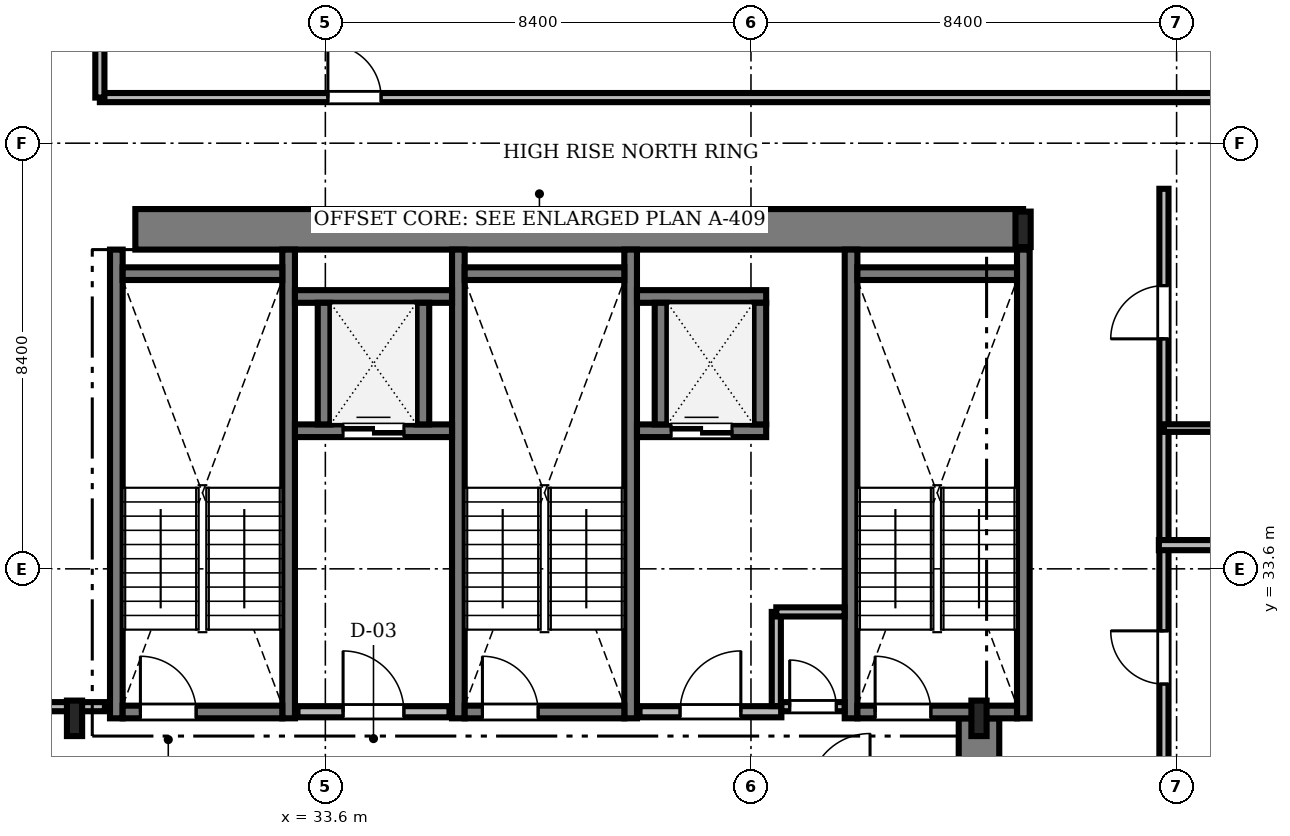
"""IFC4 building model, lengths in metres.
Left out: names, types, materials, properties, quantities, classifications, styles, units other than length and angle.
Written with IfcOpenShell. Run it as: python <this file> out.ifc"""

import sys

from ifc_helpers import new_model, si_unit, direction, frame, frame_2d, origin, origin_2d, place, context, subcontext, project, spatial, rectangle, i_section, extrude, source, transform, mapped, element, fill, save


model = new_model("IFC4")
c1 = context("Model", 3, precision=1e-05, world=origin(), true_north=direction((0.0, 1.0)))
c2 = subcontext(c1, "Body", "Model", "MODEL_VIEW")
j1 = project(units=[si_unit("LENGTHUNIT", "METRE"), si_unit("PLANEANGLEUNIT", "RADIAN")], contexts=[c1])
p1 = place(None, origin())
s1 = spatial("IfcSite", under=j1, at=p1, CompositionType="ELEMENT")
p2 = place(p1, origin())
s2 = spatial("IfcBuilding", under=s1, at=p2, CompositionType="ELEMENT")
p3 = place(p2, frame((0.0, 0.0, 196.05)))
s3 = spatial("IfcBuildingStorey", under=s2, at=p3, CompositionType="ELEMENT", Elevation=196.05)
m1 = source(origin(), c2, "Body", "SweptSolid", [
    extrude(rectangle(XDim=17.52, YDim=0.8, at=frame_2d((8.76, 0.0))), origin(), (0.0, 0.0, 1.0), 3.53),
])
p4 = place(p3, frame((29.85, 40.3, 0.0), z_axis=(0.0, 0.0, 1.0), x_axis=(1.0, 0.0, 0.0)))
e1 = element("IfcWall", 1, at=p4, inside=s3, PredefinedType="SHEAR", context=c2, shape_type="MappedRepresentation", body=[
    mapped(m1, transform((0.0, 0.0, 0.0), scale=1.0)),
])
m2 = source(origin(), c2, "Body", "SweptSolid", [
    extrude(rectangle(XDim=13.15, YDim=0.8, at=frame_2d((6.575, 0.0))), origin(), (0.0, 0.0, 1.0), 3.53),
])
p5 = place(p3, frame((46.5, 17.5, 0.0), z_axis=(0.0, 0.0, 1.0), x_axis=(0.0, 1.0, 0.0)))
e2 = element("IfcWall", 2, at=p5, inside=s3, PredefinedType="SHEAR", context=c2, shape_type="MappedRepresentation", body=[
    mapped(m2, transform((0.0, 0.0, 0.0), scale=1.0)),
])
m3 = source(origin(), c2, "Body", "SweptSolid", [
    extrude(i_section(OverallWidth=0.3, OverallDepth=0.7, WebThickness=0.017, FlangeThickness=0.032, FilletRadius=0.027, at=origin_2d()), origin(), (0.0, 0.0, 1.0), 3.53),
])
for number, where, z_axis, x_axis in (
    (3, (28.65, 30.65, 0.0), (0.0, 0.0, 1.0), (1.0, 0.0, 0.0)),
    (4, (46.5, 30.65, 0.0), (0.0, 0.0, 1.0), (1.0, 0.0, 0.0)),
    (5, (47.37, 40.3, 0.0), (0.0, 0.0, 1.0), (1.0, 0.0, 0.0)),
):
    element("IfcColumn", number, at=place(p3, frame(where, z_axis=z_axis, x_axis=x_axis)), inside=s3, PredefinedType="COLUMN", context=c2, shape_type="MappedRepresentation", body=[
        mapped(m3, transform((0.0, 0.0, 0.0), scale=1.0)),
    ])
m4 = source(origin(), c2, "Body", "SweptSolid", [
    extrude(rectangle(XDim=9.25, YDim=0.25, at=frame_2d((4.625, 0.0))), origin(), (0.0, 0.0, 1.0), 3.55),
])
for number, where, z_axis, x_axis in (
    (6, (29.475, 30.65, 0.0), (0.0, 0.0, 1.0), (0.0, 1.0, 0.0)),
    (7, (32.875, 30.65, 0.0), (0.0, 0.0, 1.0), (0.0, 1.0, 0.0)),
):
    element("IfcWall", number, at=place(p3, frame(where, z_axis=z_axis, x_axis=x_axis)), inside=s3, PredefinedType="SOLIDWALL", context=c2, shape_type="MappedRepresentation", body=[
        mapped(m4, transform((0.0, 0.0, 0.0), scale=1.0)),
    ])
m5 = source(origin(), c2, "Body", "SweptSolid", [
    extrude(rectangle(XDim=3.15, YDim=0.25, at=frame_2d((1.575, 0.0))), origin(), (0.0, 0.0, 1.0), 3.55),
])
p6 = place(p3, frame((29.6, 39.425, 0.0), z_axis=(0.0, 0.0, 1.0), x_axis=(1.0, 0.0, 0.0)))
e8 = element("IfcWall", 8, at=p6, inside=s3, PredefinedType="SOLIDWALL", context=c2, shape_type="MappedRepresentation", body=[
    mapped(m5, transform((0.0, 0.0, 0.0), scale=1.0)),
])
p7 = place(p3, frame((29.6, 30.775, 0.0), z_axis=(0.0, 0.0, 1.0), x_axis=(1.0, 0.0, 0.0)))
e9 = element("IfcWall", 9, at=p7, inside=s3, PredefinedType="SOLIDWALL", context=c2, shape_type="MappedRepresentation", body=[
    mapped(m5, transform((0.0, 0.0, 0.0), scale=1.0)),
])
m6 = source(origin(), c2, "Body", "SweptSolid", [
    extrude(rectangle(XDim=1.1, YDim=2.2, at=frame_2d((0.55, 1.1))), frame((0.0, 0.135, 0.0), z_axis=(0.0, -1.0, 0.0), x_axis=(1.0, 0.0, 0.0)), (0.0, 0.0, 1.0), 0.27),
])
p8 = place(p7, frame((0.35, 0.0, 0.0)))
e10 = element("IfcOpeningElement", 10, at=p8, cuts=e9, PredefinedType="OPENING", context=c2, shape_type="MappedRepresentation", body=[
    mapped(m6, transform((0.0, 0.0, 0.0), scale=1.0)),
])
for number, where, z_axis, x_axis in (
    (11, (36.225, 30.65, 0.0), (0.0, 0.0, 1.0), (0.0, 1.0, 0.0)),
    (12, (39.625, 30.65, 0.0), (0.0, 0.0, 1.0), (0.0, 1.0, 0.0)),
):
    element("IfcWall", number, at=place(p3, frame(where, z_axis=z_axis, x_axis=x_axis)), inside=s3, PredefinedType="SOLIDWALL", context=c2, shape_type="MappedRepresentation", body=[
        mapped(m4, transform((0.0, 0.0, 0.0), scale=1.0)),
    ])
p9 = place(p3, frame((36.35, 39.425, 0.0), z_axis=(0.0, 0.0, 1.0), x_axis=(1.0, 0.0, 0.0)))
e13 = element("IfcWall", 13, at=p9, inside=s3, PredefinedType="SOLIDWALL", context=c2, shape_type="MappedRepresentation", body=[
    mapped(m5, transform((0.0, 0.0, 0.0), scale=1.0)),
])
p10 = place(p3, frame((36.35, 30.775, 0.0), z_axis=(0.0, 0.0, 1.0), x_axis=(1.0, 0.0, 0.0)))
e14 = element("IfcWall", 14, at=p10, inside=s3, PredefinedType="SOLIDWALL", context=c2, shape_type="MappedRepresentation", body=[
    mapped(m5, transform((0.0, 0.0, 0.0), scale=1.0)),
])
p11 = place(p10, frame((0.35, 0.0, 0.0)))
e15 = element("IfcOpeningElement", 15, at=p11, cuts=e14, PredefinedType="OPENING", context=c2, shape_type="MappedRepresentation", body=[
    mapped(m6, transform((0.0, 0.0, 0.0), scale=1.0)),
])
for number, where, z_axis, x_axis in (
    (16, (43.975, 30.65, 0.0), (0.0, 0.0, 1.0), (0.0, 1.0, 0.0)),
    (17, (47.375, 30.65, 0.0), (0.0, 0.0, 1.0), (0.0, 1.0, 0.0)),
):
    element("IfcWall", number, at=place(p3, frame(where, z_axis=z_axis, x_axis=x_axis)), inside=s3, PredefinedType="SOLIDWALL", context=c2, shape_type="MappedRepresentation", body=[
        mapped(m4, transform((0.0, 0.0, 0.0), scale=1.0)),
    ])
p12 = place(p3, frame((44.1, 39.425, 0.0), z_axis=(0.0, 0.0, 1.0), x_axis=(1.0, 0.0, 0.0)))
e18 = element("IfcWall", 18, at=p12, inside=s3, PredefinedType="SOLIDWALL", context=c2, shape_type="MappedRepresentation", body=[
    mapped(m5, transform((0.0, 0.0, 0.0), scale=1.0)),
])
p13 = place(p3, frame((44.1, 30.775, 0.0), z_axis=(0.0, 0.0, 1.0), x_axis=(1.0, 0.0, 0.0)))
e19 = element("IfcWall", 19, at=p13, inside=s3, PredefinedType="SOLIDWALL", context=c2, shape_type="MappedRepresentation", body=[
    mapped(m5, transform((0.0, 0.0, 0.0), scale=1.0)),
])
p14 = place(p13, frame((0.35, 0.0, 0.0)))
e20 = element("IfcOpeningElement", 20, at=p14, cuts=e19, PredefinedType="OPENING", context=c2, shape_type="MappedRepresentation", body=[
    mapped(m6, transform((0.0, 0.0, 0.0), scale=1.0)),
])
m7 = source(origin(), c2, "Body", "SweptSolid", [
    extrude(rectangle(XDim=3.0, YDim=0.22, at=frame_2d((1.5, 0.0))), origin(), (0.0, 0.0, 1.0), 3.53),
])
p15 = place(p3, frame((33.05, 30.78, 0.0), z_axis=(0.0, 0.0, 1.0), x_axis=(1.0, 0.0, 0.0)))
e21 = element("IfcWall", 21, at=p15, inside=s3, PredefinedType="SOLIDWALL", context=c2, shape_type="MappedRepresentation", body=[
    mapped(m7, transform((0.0, 0.0, 0.0), scale=1.0)),
])
m8 = source(origin(), c2, "Body", "SweptSolid", [
    extrude(rectangle(XDim=1.2, YDim=2.2, at=frame_2d((0.6, 1.1))), frame((0.0, 0.12, 0.0), z_axis=(0.0, -1.0, 0.0), x_axis=(1.0, 0.0, 0.0)), (0.0, 0.0, 1.0), 0.24),
])
p16 = place(p15, frame((0.9, 0.0, 0.0)))
e22 = element("IfcOpeningElement", 22, at=p16, cuts=e21, PredefinedType="OPENING", context=c2, shape_type="MappedRepresentation", body=[
    mapped(m8, transform((0.0, 0.0, 0.0), scale=1.0)),
])
m9 = source(origin(), c2, "Body", "SweptSolid", [
    extrude(rectangle(XDim=2.8, YDim=0.22, at=frame_2d((1.4, 0.0))), origin(), (0.0, 0.0, 1.0), 3.53),
])
p17 = place(p3, frame((39.8, 30.78, 0.0), z_axis=(0.0, 0.0, 1.0), x_axis=(1.0, 0.0, 0.0)))
e23 = element("IfcWall", 23, at=p17, inside=s3, PredefinedType="SOLIDWALL", context=c2, shape_type="MappedRepresentation", body=[
    mapped(m9, transform((0.0, 0.0, 0.0), scale=1.0)),
])
p18 = place(p17, frame((0.8, 0.0, 0.0)))
e24 = element("IfcOpeningElement", 24, at=p18, cuts=e23, PredefinedType="OPENING", context=c2, shape_type="MappedRepresentation", body=[
    mapped(m8, transform((0.0, 0.0, 0.0), scale=1.0)),
])
m10 = source(origin(), c2, "Body", "SweptSolid", [
    extrude(rectangle(XDim=3.1, YDim=0.25, at=frame_2d((1.55, 0.0))), origin(), (0.0, 0.0, 1.0), 3.53),
])
p19 = place(p3, frame((33.0, 36.325, 0.0), z_axis=(0.0, 0.0, 1.0), x_axis=(1.0, 0.0, 0.0)))
e25 = element("IfcWall", 25, at=p19, inside=s3, PredefinedType="SOLIDWALL", context=c2, shape_type="MappedRepresentation", body=[
    mapped(m10, transform((0.0, 0.0, 0.0), scale=1.0)),
])
m11 = source(origin(), c2, "Body", "SweptSolid", [
    extrude(rectangle(XDim=1.2, YDim=2.25, at=frame_2d((0.6, 1.125))), frame((0.0, 0.135, 0.0), z_axis=(0.0, -1.0, 0.0), x_axis=(1.0, 0.0, 0.0)), (0.0, 0.0, 1.0), 0.27),
])
p20 = place(p19, frame((0.95, 0.0, 0.0)))
e26 = element("IfcOpeningElement", 26, at=p20, cuts=e25, PredefinedType="OPENING", context=c2, shape_type="MappedRepresentation", body=[
    mapped(m11, transform((0.0, 0.0, 0.0), scale=1.0)),
])
p21 = place(p3, frame((33.0, 38.975, 0.0), z_axis=(0.0, 0.0, 1.0), x_axis=(1.0, 0.0, 0.0)))
e27 = element("IfcWall", 27, at=p21, inside=s3, PredefinedType="SOLIDWALL", context=c2, shape_type="MappedRepresentation", body=[
    mapped(m10, transform((0.0, 0.0, 0.0), scale=1.0)),
])
m12 = source(origin(), c2, "Body", "SweptSolid", [
    extrude(rectangle(XDim=2.4, YDim=0.25, at=frame_2d((1.2, 0.0))), origin(), (0.0, 0.0, 1.0), 3.53),
])
for number, where, z_axis, x_axis in (
    (28, (33.575, 36.45, 0.0), (0.0, 0.0, 1.0), (0.0, 1.0, 0.0)),
    (29, (35.525, 36.45, 0.0), (0.0, 0.0, 1.0), (0.0, 1.0, 0.0)),
):
    element("IfcWall", number, at=place(p3, frame(where, z_axis=z_axis, x_axis=x_axis)), inside=s3, PredefinedType="SOLIDWALL", context=c2, shape_type="MappedRepresentation", body=[
        mapped(m12, transform((0.0, 0.0, 0.0), scale=1.0)),
    ])
m13 = source(origin(), c2, "Body", "SweptSolid", [
    extrude(rectangle(XDim=2.55, YDim=0.25, at=frame_2d((1.275, 0.0))), origin(), (0.0, 0.0, 1.0), 3.53),
])
p22 = place(p3, frame((39.75, 36.325, 0.0), z_axis=(0.0, 0.0, 1.0), x_axis=(1.0, 0.0, 0.0)))
e30 = element("IfcWall", 30, at=p22, inside=s3, PredefinedType="SOLIDWALL", context=c2, shape_type="MappedRepresentation", body=[
    mapped(m13, transform((0.0, 0.0, 0.0), scale=1.0)),
])
p23 = place(p22, frame((0.675, 0.0, 0.0)))
e31 = element("IfcOpeningElement", 31, at=p23, cuts=e30, PredefinedType="OPENING", context=c2, shape_type="MappedRepresentation", body=[
    mapped(m11, transform((0.0, 0.0, 0.0), scale=1.0)),
])
p24 = place(p3, frame((39.75, 38.975, 0.0), z_axis=(0.0, 0.0, 1.0), x_axis=(1.0, 0.0, 0.0)))
e32 = element("IfcWall", 32, at=p24, inside=s3, PredefinedType="SOLIDWALL", context=c2, shape_type="MappedRepresentation", body=[
    mapped(m13, transform((0.0, 0.0, 0.0), scale=1.0)),
])
for number, where, z_axis, x_axis in (
    (33, (40.225, 36.45, 0.0), (0.0, 0.0, 1.0), (0.0, 1.0, 0.0)),
    (34, (42.175, 36.45, 0.0), (0.0, 0.0, 1.0), (0.0, 1.0, 0.0)),
):
    element("IfcWall", number, at=place(p3, frame(where, z_axis=z_axis, x_axis=x_axis)), inside=s3, PredefinedType="SOLIDWALL", context=c2, shape_type="MappedRepresentation", body=[
        mapped(m12, transform((0.0, 0.0, 0.0), scale=1.0)),
    ])
m14 = source(origin(), c2, "Body", "SweptSolid", [
    extrude(rectangle(XDim=28.428, YDim=0.18, at=frame_2d((14.214, 0.0))), origin(), (0.0, 0.0, 1.0), 2.772),
])
p25 = place(p3, frame((29.15, 42.9, 0.0), z_axis=(0.0, 0.0, 1.0), x_axis=(1.0, 0.0, 0.0)))
e35 = element("IfcWall", 35, at=p25, inside=s3, PredefinedType="PARTITIONING", context=c2, shape_type="MappedRepresentation", body=[
    mapped(m14, transform((0.0, 0.0, 0.0), scale=1.0)),
])
m15 = source(origin(), c2, "Body", "SweptSolid", [
    extrude(rectangle(XDim=1.05, YDim=2.2, at=frame_2d((0.525, 1.1))), frame((0.0, 0.1, 0.0), z_axis=(0.0, -1.0, 0.0), x_axis=(1.0, 0.0, 0.0)), (0.0, 0.0, 1.0), 0.2),
])
p26 = place(p25, frame((4.5, 0.0, 0.0)))
e36 = element("IfcOpeningElement", 36, at=p26, cuts=e35, PredefinedType="OPENING", context=c2, shape_type="MappedRepresentation", body=[
    mapped(m15, transform((0.0, 0.0, 0.0), scale=1.0)),
])
m16 = source(origin(), c2, "Body", "SweptSolid", [
    extrude(rectangle(XDim=27.47, YDim=0.18, at=frame_2d((13.735, 0.0))), origin(), (0.0, 0.0, 1.0), 2.972),
])
p27 = place(p3, frame((50.15, 13.63, 0.0), z_axis=(0.0, 0.0, 1.0), x_axis=(0.0, 1.0, 0.0)))
e37 = element("IfcWall", 37, at=p27, inside=s3, PredefinedType="PARTITIONING", context=c2, shape_type="MappedRepresentation", body=[
    mapped(m16, transform((0.0, 0.0, 0.0), scale=1.0)),
])
p28 = place(p27, frame((4.071, 0.0, 0.0)))
e38 = element("IfcOpeningElement", 38, at=p28, cuts=e37, PredefinedType="OPENING", context=c2, shape_type="MappedRepresentation", body=[
    mapped(m15, transform((0.0, 0.0, 0.0), scale=1.0)),
])
p29 = place(p27, frame((10.884, 0.0, 0.0)))
e39 = element("IfcOpeningElement", 39, at=p29, cuts=e37, PredefinedType="OPENING", context=c2, shape_type="MappedRepresentation", body=[
    mapped(m15, transform((0.0, 0.0, 0.0), scale=1.0)),
])
p30 = place(p27, frame((17.696, 0.0, 0.0)))
e40 = element("IfcOpeningElement", 40, at=p30, cuts=e37, PredefinedType="OPENING", context=c2, shape_type="MappedRepresentation", body=[
    mapped(m15, transform((0.0, 0.0, 0.0), scale=1.0)),
])
p31 = place(p27, frame((24.509, 0.0, 0.0)))
e41 = element("IfcOpeningElement", 41, at=p31, cuts=e37, PredefinedType="OPENING", context=c2, shape_type="MappedRepresentation", body=[
    mapped(m15, transform((0.0, 0.0, 0.0), scale=1.0)),
])
m17 = source(origin(), c2, "Body", "SweptSolid", [
    extrude(rectangle(XDim=17.828, YDim=0.18, at=frame_2d((8.914, 0.0))), origin(), (0.0, 0.0, 1.0), 2.772),
])
p32 = place(p3, frame((11.422, 30.88, 0.0), z_axis=(0.0, 0.0, 1.0), x_axis=(1.0, 0.0, 0.0)))
e42 = element("IfcWall", 42, at=p32, inside=s3, PredefinedType="PARTITIONING", context=c2, shape_type="MappedRepresentation", body=[
    mapped(m17, transform((0.0, 0.0, 0.0), scale=1.0)),
])
p33 = place(p32, frame((10.778, 0.0, 0.0)))
e43 = element("IfcOpeningElement", 43, at=p33, cuts=e42, PredefinedType="OPENING", context=c2, shape_type="MappedRepresentation", body=[
    mapped(m15, transform((0.0, 0.0, 0.0), scale=1.0)),
])
m18 = source(origin(), c2, "Body", "SweptSolid", [
    extrude(rectangle(XDim=1.248, YDim=0.18, at=frame_2d((0.624, 0.0))), origin(), (0.0, 0.0, 1.0), 3.53),
])
p34 = place(p3, frame((42.6, 30.88, 0.0), z_axis=(0.0, 0.0, 1.0), x_axis=(1.0, 0.0, 0.0)))
e44 = element("IfcWall", 44, at=p34, inside=s3, PredefinedType="PARTITIONING", context=c2, shape_type="MappedRepresentation", body=[
    mapped(m18, transform((0.0, 0.0, 0.0), scale=1.0)),
])
m19 = source(origin(), c2, "Body", "SweptSolid", [
    extrude(rectangle(XDim=0.92, YDim=2.1, at=frame_2d((0.46, 1.05))), frame((0.0, 0.1, 0.0), z_axis=(0.0, -1.0, 0.0), x_axis=(1.0, 0.0, 0.0)), (0.0, 0.0, 1.0), 0.2),
])
p35 = place(p34, frame((0.164, 0.0, 0.0)))
e45 = element("IfcOpeningElement", 45, at=p35, cuts=e44, PredefinedType="OPENING", context=c2, shape_type="MappedRepresentation", body=[
    mapped(m19, transform((0.0, 0.0, 0.0), scale=1.0)),
])
m20 = source(origin(), c2, "Body", "SweptSolid", [
    extrude(rectangle(XDim=7.528, YDim=0.2, at=frame_2d((3.764, 0.0))), origin(), (0.0, 0.0, 1.0), 2.772),
])
p36 = place(p3, frame((50.05, 34.068, 0.0), z_axis=(0.0, 0.0, 1.0), x_axis=(1.0, 0.0, 0.0)))
e46 = element("IfcWall", 46, at=p36, inside=s3, PredefinedType="PARTITIONING", context=c2, shape_type="MappedRepresentation", body=[
    mapped(m20, transform((0.0, 0.0, 0.0), scale=1.0)),
])
m21 = source(origin(), c2, "Body", "SweptSolid", [
    extrude(rectangle(XDim=5.378, YDim=0.18, at=frame_2d((2.689, 0.0))), origin(), (0.0, 0.0, 1.0), 2.772),
])
p37 = place(p3, frame((29.15, 42.9, 0.0), z_axis=(0.0, 0.0, 1.0), x_axis=(0.0, 1.0, 0.0)))
e47 = element("IfcWall", 47, at=p37, inside=s3, PredefinedType="PARTITIONING", context=c2, shape_type="MappedRepresentation", body=[
    mapped(m21, transform((0.0, 0.0, 0.0), scale=1.0)),
])
m22 = source(origin(), c2, "Body", "SweptSolid", [
    extrude(rectangle(XDim=2.36, YDim=0.15, at=frame_2d((1.18, 0.0))), origin(), (0.0, 0.0, 1.0), 3.53),
])
p38 = place(p3, frame((50.15, 36.378, 0.0), z_axis=(0.0, 0.0, 1.0), x_axis=(1.0, 0.0, 0.0)))
e48 = element("IfcWall", 48, at=p38, inside=s3, PredefinedType="PARTITIONING", context=c2, shape_type="MappedRepresentation", body=[
    mapped(m22, transform((0.0, 0.0, 0.0), scale=1.0)),
])
m23 = source(origin(), c2, "Body", "SweptSolid", [
    extrude(rectangle(XDim=1.858, YDim=0.18, at=frame_2d((0.929, 0.0))), origin(), (0.0, 0.0, 1.0), 3.53),
])
p39 = place(p3, frame((42.5, 30.892, 0.0), z_axis=(0.0, 0.0, 1.0), x_axis=(0.0, 1.0, 0.0)))
e49 = element("IfcWall", 49, at=p39, inside=s3, PredefinedType="PARTITIONING", context=c2, shape_type="MappedRepresentation", body=[
    mapped(m23, transform((0.0, 0.0, 0.0), scale=1.0)),
])
m24 = source(origin(), c2, "Body", "SweptSolid", [
    extrude(rectangle(XDim=1.348, YDim=0.18, at=frame_2d((0.674, 0.0))), origin(), (0.0, 0.0, 1.0), 3.53),
])
p40 = place(p3, frame((42.5, 32.75, 0.0), z_axis=(0.0, 0.0, 1.0), x_axis=(1.0, 0.0, 0.0)))
e50 = element("IfcWall", 50, at=p40, inside=s3, PredefinedType="PARTITIONING", context=c2, shape_type="MappedRepresentation", body=[
    mapped(m24, transform((0.0, 0.0, 0.0), scale=1.0)),
])
m25 = source(origin(), c2, "Body", "SweptSolid", [
    extrude(rectangle(XDim=1.1, YDim=2.2, at=frame_2d((0.55, 1.1))), frame((0.0, 0.025, 0.0), z_axis=(0.0, -1.0, 0.0), x_axis=(1.0, 0.0, 0.0)), (0.0, 0.0, 1.0), 0.05),
])
p41 = place(p8, origin())
e51 = element("IfcDoor", 51, at=p41, inside=s3, OperationType="SINGLE_SWING_LEFT", PredefinedType="DOOR", context=c2, shape_type="MappedRepresentation", body=[
    mapped(m25, transform((0.0, 0.0, 0.0), scale=1.0)),
])
fill(e10, e51)
p42 = place(p11, origin())
e52 = element("IfcDoor", 52, at=p42, inside=s3, OperationType="SINGLE_SWING_LEFT", PredefinedType="DOOR", context=c2, shape_type="MappedRepresentation", body=[
    mapped(m25, transform((0.0, 0.0, 0.0), scale=1.0)),
])
fill(e15, e52)
p43 = place(p14, origin())
e53 = element("IfcDoor", 53, at=p43, inside=s3, OperationType="SINGLE_SWING_LEFT", PredefinedType="DOOR", context=c2, shape_type="MappedRepresentation", body=[
    mapped(m25, transform((0.0, 0.0, 0.0), scale=1.0)),
])
fill(e20, e53)
m26 = source(origin(), c2, "Body", "SweptSolid", [
    extrude(rectangle(XDim=1.2, YDim=2.2, at=frame_2d((0.6, 1.1))), frame((0.0, 0.025, 0.0), z_axis=(0.0, -1.0, 0.0), x_axis=(1.0, 0.0, 0.0)), (0.0, 0.0, 1.0), 0.05),
])
p44 = place(p16, origin())
e54 = element("IfcDoor", 54, at=p44, inside=s3, OperationType="SINGLE_SWING_LEFT", PredefinedType="DOOR", context=c2, shape_type="MappedRepresentation", body=[
    mapped(m26, transform((0.0, 0.0, 0.0), scale=1.0)),
])
fill(e22, e54)
p45 = place(p18, origin())
e55 = element("IfcDoor", 55, at=p45, inside=s3, OperationType="SINGLE_SWING_RIGHT", PredefinedType="DOOR", context=c2, shape_type="MappedRepresentation", body=[
    mapped(m26, transform((0.0, 0.0, 0.0), scale=1.0)),
])
fill(e24, e55)
m27 = source(origin(), c2, "Body", "SweptSolid", [
    extrude(rectangle(XDim=1.2, YDim=2.25, at=frame_2d((0.6, 1.125))), frame((0.0, 0.025, 0.0), z_axis=(0.0, -1.0, 0.0), x_axis=(1.0, 0.0, 0.0)), (0.0, 0.0, 1.0), 0.05),
])
p46 = place(p20, origin())
e56 = element("IfcDoor", 56, at=p46, inside=s3, OperationType="DOUBLE_DOOR_SLIDING", PredefinedType="DOOR", context=c2, shape_type="MappedRepresentation", body=[
    mapped(m27, transform((0.0, 0.0, 0.0), scale=1.0)),
])
fill(e26, e56)
p47 = place(p23, origin())
e57 = element("IfcDoor", 57, at=p47, inside=s3, OperationType="DOUBLE_DOOR_SLIDING", PredefinedType="DOOR", context=c2, shape_type="MappedRepresentation", body=[
    mapped(m27, transform((0.0, 0.0, 0.0), scale=1.0)),
])
fill(e31, e57)
m28 = source(origin(), c2, "Body", "SweptSolid", [
    extrude(rectangle(XDim=1.05, YDim=2.2, at=frame_2d((0.525, 1.1))), frame((0.0, 0.025, 0.0), z_axis=(0.0, -1.0, 0.0), x_axis=(1.0, 0.0, 0.0)), (0.0, 0.0, 1.0), 0.05),
])
p48 = place(p26, origin())
e58 = element("IfcDoor", 58, at=p48, inside=s3, OperationType="SINGLE_SWING_LEFT", PredefinedType="DOOR", context=c2, shape_type="MappedRepresentation", body=[
    mapped(m28, transform((0.0, 0.0, 0.0), scale=1.0)),
])
fill(e36, e58)
p49 = place(p30, origin())
e59 = element("IfcDoor", 59, at=p49, inside=s3, OperationType="SINGLE_SWING_RIGHT", PredefinedType="DOOR", context=c2, shape_type="MappedRepresentation", body=[
    mapped(m28, transform((0.0, 0.0, 0.0), scale=1.0)),
])
fill(e40, e59)
p50 = place(p31, origin())
e60 = element("IfcDoor", 60, at=p50, inside=s3, OperationType="SINGLE_SWING_LEFT", PredefinedType="DOOR", context=c2, shape_type="MappedRepresentation", body=[
    mapped(m28, transform((0.0, 0.0, 0.0), scale=1.0)),
])
fill(e41, e60)
m29 = source(origin(), c2, "Body", "SweptSolid", [
    extrude(rectangle(XDim=0.92, YDim=2.1, at=frame_2d((0.46, 1.05))), frame((0.0, 0.025, 0.0), z_axis=(0.0, -1.0, 0.0), x_axis=(1.0, 0.0, 0.0)), (0.0, 0.0, 1.0), 0.05),
])
p51 = place(p35, origin())
e61 = element("IfcDoor", 61, at=p51, inside=s3, OperationType="SINGLE_SWING_LEFT", PredefinedType="DOOR", context=c2, shape_type="MappedRepresentation", body=[
    mapped(m29, transform((0.0, 0.0, 0.0), scale=1.0)),
])
fill(e45, e61)
save(model, sys.argv[1])
